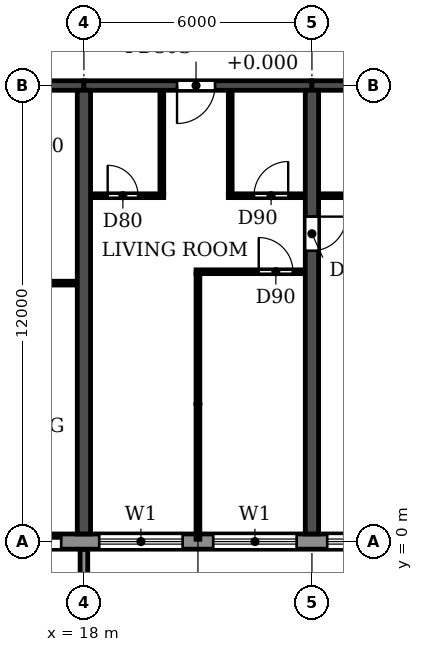
"""IFC4 building model, lengths in metres.
Left out: names, types, materials, properties, quantities, classifications, styles, units other than length and angle.
Written with IfcOpenShell. Run it as: python <this file> out.ifc"""

import sys

from ifc_helpers import new_model, si_unit, direction, frame, frame_2d, origin, place, context, subcontext, project, spatial, polyline, rectangle, outline, extrude, source, transform, mapped, element, fill, save


model = new_model("IFC4")
c1 = context("Model", 3, precision=1e-05, world=origin(), true_north=direction((0.0, 1.0)))
c2 = subcontext(c1, "Body", "Model", "MODEL_VIEW")
j1 = project(units=[si_unit("LENGTHUNIT", "METRE"), si_unit("PLANEANGLEUNIT", "RADIAN")], contexts=[c1])
p1 = place(None, origin())
s1 = spatial("IfcSite", under=j1, at=p1, CompositionType="ELEMENT")
p2 = place(p1, origin())
s2 = spatial("IfcBuilding", under=s1, at=p2, CompositionType="ELEMENT")
p3 = place(p2, frame((0.0, 0.0, 92.7)))
s3 = spatial("IfcBuildingStorey", under=s2, at=p3, CompositionType="ELEMENT", Elevation=92.7)
p4 = place(p3, frame((18.0, 0.2, 0.0), z_axis=(0.0, 0.0, 1.0), x_axis=(0.0, 1.0, 0.0)))
e1 = element("IfcWall", 1, at=p4, inside=s3, PredefinedType="SHEAR", context=c2, shape_type="SweptSolid", body=[
    extrude(rectangle(XDim=11.675, YDim=0.35, at=frame_2d((5.837, 0.0))), origin(), (0.0, 0.0, 1.0), 3.06),
])
p5 = place(p3, frame((24.0, 0.2, 0.0), z_axis=(0.0, 0.0, 1.0), x_axis=(0.0, 1.0, 0.0)))
e2 = element("IfcWall", 2, at=p5, inside=s3, PredefinedType="SHEAR", context=c2, shape_type="SweptSolid", body=[
    extrude(rectangle(XDim=11.675, YDim=0.35, at=frame_2d((5.837, 0.0))), origin(), (0.0, 0.0, 1.0), 3.06),
])
p6 = place(p5, frame((7.45, 0.0, 0.0)))
e3 = element("IfcOpeningElement", 3, at=p6, cuts=e2, PredefinedType="OPENING", context=c2, shape_type="SweptSolid", body=[
    extrude(rectangle(XDim=0.9, YDim=2.1, at=frame_2d((0.45, 1.05))), frame((0.0, 0.185, 0.0), z_axis=(0.0, -1.0, 0.0), x_axis=(1.0, 0.0, 0.0)), (0.0, 0.0, 1.0), 0.37),
])
p7 = place(p3, frame((12.0, 12.0, 0.0), z_axis=(0.0, 0.0, 1.0), x_axis=(1.0, 0.0, 0.0)))
e4 = element("IfcWall", 4, at=p7, inside=s3, PredefinedType="SHEAR", context=c2, shape_type="SweptSolid", body=[
    extrude(rectangle(XDim=6.0, YDim=0.25, at=frame_2d((3.0, 0.0))), origin(), (0.0, 0.0, 1.0), 2.46),
])
p8 = place(p7, frame((2.55, 0.0, 0.0)))
e5 = element("IfcOpeningElement", 5, at=p8, cuts=e4, PredefinedType="OPENING", context=c2, shape_type="SweptSolid", body=[
    extrude(rectangle(XDim=1.0, YDim=2.1, at=frame_2d((0.5, 1.05))), frame((0.0, 0.135, 0.0), z_axis=(0.0, -1.0, 0.0), x_axis=(1.0, 0.0, 0.0)), (0.0, 0.0, 1.0), 0.27),
])
p9 = place(p3, frame((18.0, 12.0, 0.0), z_axis=(0.0, 0.0, 1.0), x_axis=(1.0, 0.0, 0.0)))
e6 = element("IfcWall", 6, at=p9, inside=s3, PredefinedType="SHEAR", context=c2, shape_type="SweptSolid", body=[
    extrude(rectangle(XDim=6.0, YDim=0.25, at=frame_2d((3.0, 0.0))), origin(), (0.0, 0.0, 1.0), 2.46),
])
p10 = place(p9, frame((2.45, 0.0, 0.0)))
e7 = element("IfcOpeningElement", 7, at=p10, cuts=e6, PredefinedType="OPENING", context=c2, shape_type="SweptSolid", body=[
    extrude(rectangle(XDim=1.0, YDim=2.1, at=frame_2d((0.5, 1.05))), frame((0.0, 0.135, 0.0), z_axis=(0.0, -1.0, 0.0), x_axis=(1.0, 0.0, 0.0)), (0.0, 0.0, 1.0), 0.27),
])
p11 = place(p3, frame((24.0, 12.0, 0.0), z_axis=(0.0, 0.0, 1.0), x_axis=(1.0, 0.0, 0.0)))
e8 = element("IfcWall", 8, at=p11, inside=s3, PredefinedType="SHEAR", context=c2, shape_type="SweptSolid", body=[
    extrude(rectangle(XDim=6.0, YDim=0.25, at=frame_2d((3.0, 0.0))), origin(), (0.0, 0.0, 1.0), 2.46),
])
p12 = place(p3, frame((10.683, 0.0, 0.0), z_axis=(0.0, 0.0, 1.0), x_axis=(1.0, 0.0, 0.0)))
e9 = element("IfcWall", 9, at=p12, inside=s3, PredefinedType="STANDARD", context=c2, shape_type="SweptSolid", body=[
    extrude(rectangle(XDim=80.634, YDim=0.4, at=frame_2d((40.317, 0.0))), origin(), (0.0, 0.0, 1.0), 3.06),
])
p13 = place(p12, frame((1.717, 0.0, 0.9)))
e10 = element("IfcOpeningElement", 10, at=p13, cuts=e9, PredefinedType="OPENING", context=c2, shape_type="SweptSolid", body=[
    extrude(rectangle(XDim=2.2, YDim=1.5, at=frame_2d((1.1, 0.75))), frame((0.0, 0.21, 0.0), z_axis=(0.0, -1.0, 0.0), x_axis=(1.0, 0.0, 0.0)), (0.0, 0.0, 1.0), 0.42),
])
p14 = place(p12, frame((4.917, 0.0, 0.0)))
e11 = element("IfcOpeningElement", 11, at=p14, cuts=e9, PredefinedType="OPENING", context=c2, shape_type="SweptSolid", body=[
    extrude(rectangle(XDim=1.8, YDim=2.4, at=frame_2d((0.9, 1.2))), frame((0.0, 0.21, 0.0), z_axis=(0.0, -1.0, 0.0), x_axis=(1.0, 0.0, 0.0)), (0.0, 0.0, 1.0), 0.42),
])
p15 = place(p12, frame((7.717, 0.0, 0.9)))
e12 = element("IfcOpeningElement", 12, at=p15, cuts=e9, PredefinedType="OPENING", context=c2, shape_type="SweptSolid", body=[
    extrude(rectangle(XDim=2.2, YDim=1.5, at=frame_2d((1.1, 0.75))), frame((0.0, 0.21, 0.0), z_axis=(0.0, -1.0, 0.0), x_axis=(1.0, 0.0, 0.0)), (0.0, 0.0, 1.0), 0.42),
])
p16 = place(p12, frame((10.717, 0.0, 0.9)))
e13 = element("IfcOpeningElement", 13, at=p16, cuts=e9, PredefinedType="OPENING", context=c2, shape_type="SweptSolid", body=[
    extrude(rectangle(XDim=2.2, YDim=1.5, at=frame_2d((1.1, 0.75))), frame((0.0, 0.21, 0.0), z_axis=(0.0, -1.0, 0.0), x_axis=(1.0, 0.0, 0.0)), (0.0, 0.0, 1.0), 0.42),
])
p17 = place(p12, frame((13.717, 0.0, 0.9)))
e14 = element("IfcOpeningElement", 14, at=p17, cuts=e9, PredefinedType="OPENING", context=c2, shape_type="SweptSolid", body=[
    extrude(rectangle(XDim=2.2, YDim=1.5, at=frame_2d((1.1, 0.75))), frame((0.0, 0.21, 0.0), z_axis=(0.0, -1.0, 0.0), x_axis=(1.0, 0.0, 0.0)), (0.0, 0.0, 1.0), 0.42),
])
p18 = place(p12, frame((16.717, 0.0, 0.9)))
e15 = element("IfcOpeningElement", 15, at=p18, cuts=e9, PredefinedType="OPENING", context=c2, shape_type="SweptSolid", body=[
    extrude(rectangle(XDim=2.2, YDim=1.5, at=frame_2d((1.1, 0.75))), frame((0.0, 0.21, 0.0), z_axis=(0.0, -1.0, 0.0), x_axis=(1.0, 0.0, 0.0)), (0.0, 0.0, 1.0), 0.42),
])
p19 = place(p12, frame((19.717, 0.0, 0.9)))
e16 = element("IfcOpeningElement", 16, at=p19, cuts=e9, PredefinedType="OPENING", context=c2, shape_type="SweptSolid", body=[
    extrude(rectangle(XDim=2.2, YDim=1.5, at=frame_2d((1.1, 0.75))), frame((0.0, 0.21, 0.0), z_axis=(0.0, -1.0, 0.0), x_axis=(1.0, 0.0, 0.0)), (0.0, 0.0, 1.0), 0.42),
])
p20 = place(p12, frame((22.717, 0.0, 0.9)))
e17 = element("IfcOpeningElement", 17, at=p20, cuts=e9, PredefinedType="OPENING", context=c2, shape_type="SweptSolid", body=[
    extrude(rectangle(XDim=2.2, YDim=1.5, at=frame_2d((1.1, 0.75))), frame((0.0, 0.21, 0.0), z_axis=(0.0, -1.0, 0.0), x_axis=(1.0, 0.0, 0.0)), (0.0, 0.0, 1.0), 0.42),
])
p21 = place(p12, frame((25.717, 0.0, 0.9)))
e18 = element("IfcOpeningElement", 18, at=p21, cuts=e9, PredefinedType="OPENING", context=c2, shape_type="SweptSolid", body=[
    extrude(rectangle(XDim=2.2, YDim=1.5, at=frame_2d((1.1, 0.75))), frame((0.0, 0.21, 0.0), z_axis=(0.0, -1.0, 0.0), x_axis=(1.0, 0.0, 0.0)), (0.0, 0.0, 1.0), 0.42),
])
p22 = place(p12, frame((28.917, 0.0, 0.0)))
e19 = element("IfcOpeningElement", 19, at=p22, cuts=e9, PredefinedType="OPENING", context=c2, shape_type="SweptSolid", body=[
    extrude(rectangle(XDim=1.8, YDim=2.4, at=frame_2d((0.9, 1.2))), frame((0.0, 0.21, 0.0), z_axis=(0.0, -1.0, 0.0), x_axis=(1.0, 0.0, 0.0)), (0.0, 0.0, 1.0), 0.42),
])
p23 = place(p12, frame((31.717, 0.0, 0.9)))
e20 = element("IfcOpeningElement", 20, at=p23, cuts=e9, PredefinedType="OPENING", context=c2, shape_type="SweptSolid", body=[
    extrude(rectangle(XDim=2.2, YDim=1.5, at=frame_2d((1.1, 0.75))), frame((0.0, 0.21, 0.0), z_axis=(0.0, -1.0, 0.0), x_axis=(1.0, 0.0, 0.0)), (0.0, 0.0, 1.0), 0.42),
])
p24 = place(p12, frame((34.717, 0.0, 0.9)))
e21 = element("IfcOpeningElement", 21, at=p24, cuts=e9, PredefinedType="OPENING", context=c2, shape_type="SweptSolid", body=[
    extrude(rectangle(XDim=2.2, YDim=1.5, at=frame_2d((1.1, 0.75))), frame((0.0, 0.21, 0.0), z_axis=(0.0, -1.0, 0.0), x_axis=(1.0, 0.0, 0.0)), (0.0, 0.0, 1.0), 0.42),
])
p25 = place(p12, frame((37.917, 0.0, 0.0)))
e22 = element("IfcOpeningElement", 22, at=p25, cuts=e9, PredefinedType="OPENING", context=c2, shape_type="SweptSolid", body=[
    extrude(rectangle(XDim=1.8, YDim=2.4, at=frame_2d((0.9, 1.2))), frame((0.0, 0.21, 0.0), z_axis=(0.0, -1.0, 0.0), x_axis=(1.0, 0.0, 0.0)), (0.0, 0.0, 1.0), 0.42),
])
p26 = place(p12, frame((40.717, 0.0, 0.9)))
e23 = element("IfcOpeningElement", 23, at=p26, cuts=e9, PredefinedType="OPENING", context=c2, shape_type="SweptSolid", body=[
    extrude(rectangle(XDim=2.2, YDim=1.5, at=frame_2d((1.1, 0.75))), frame((0.0, 0.21, 0.0), z_axis=(0.0, -1.0, 0.0), x_axis=(1.0, 0.0, 0.0)), (0.0, 0.0, 1.0), 0.42),
])
p27 = place(p12, frame((43.717, 0.0, 0.9)))
e24 = element("IfcOpeningElement", 24, at=p27, cuts=e9, PredefinedType="OPENING", context=c2, shape_type="SweptSolid", body=[
    extrude(rectangle(XDim=2.2, YDim=1.5, at=frame_2d((1.1, 0.75))), frame((0.0, 0.21, 0.0), z_axis=(0.0, -1.0, 0.0), x_axis=(1.0, 0.0, 0.0)), (0.0, 0.0, 1.0), 0.42),
])
p28 = place(p12, frame((46.717, 0.0, 0.9)))
e25 = element("IfcOpeningElement", 25, at=p28, cuts=e9, PredefinedType="OPENING", context=c2, shape_type="SweptSolid", body=[
    extrude(rectangle(XDim=2.2, YDim=1.5, at=frame_2d((1.1, 0.75))), frame((0.0, 0.21, 0.0), z_axis=(0.0, -1.0, 0.0), x_axis=(1.0, 0.0, 0.0)), (0.0, 0.0, 1.0), 0.42),
])
p29 = place(p12, frame((49.717, 0.0, 0.9)))
e26 = element("IfcOpeningElement", 26, at=p29, cuts=e9, PredefinedType="OPENING", context=c2, shape_type="SweptSolid", body=[
    extrude(rectangle(XDim=2.2, YDim=1.5, at=frame_2d((1.1, 0.75))), frame((0.0, 0.21, 0.0), z_axis=(0.0, -1.0, 0.0), x_axis=(1.0, 0.0, 0.0)), (0.0, 0.0, 1.0), 0.42),
])
p30 = place(p12, frame((52.917, 0.0, 0.0)))
e27 = element("IfcOpeningElement", 27, at=p30, cuts=e9, PredefinedType="OPENING", context=c2, shape_type="SweptSolid", body=[
    extrude(rectangle(XDim=1.8, YDim=2.4, at=frame_2d((0.9, 1.2))), frame((0.0, 0.21, 0.0), z_axis=(0.0, -1.0, 0.0), x_axis=(1.0, 0.0, 0.0)), (0.0, 0.0, 1.0), 0.42),
])
p31 = place(p12, frame((55.717, 0.0, 0.9)))
e28 = element("IfcOpeningElement", 28, at=p31, cuts=e9, PredefinedType="OPENING", context=c2, shape_type="SweptSolid", body=[
    extrude(rectangle(XDim=2.2, YDim=1.5, at=frame_2d((1.1, 0.75))), frame((0.0, 0.21, 0.0), z_axis=(0.0, -1.0, 0.0), x_axis=(1.0, 0.0, 0.0)), (0.0, 0.0, 1.0), 0.42),
])
p32 = place(p12, frame((58.717, 0.0, 0.9)))
e29 = element("IfcOpeningElement", 29, at=p32, cuts=e9, PredefinedType="OPENING", context=c2, shape_type="SweptSolid", body=[
    extrude(rectangle(XDim=2.2, YDim=1.5, at=frame_2d((1.1, 0.75))), frame((0.0, 0.21, 0.0), z_axis=(0.0, -1.0, 0.0), x_axis=(1.0, 0.0, 0.0)), (0.0, 0.0, 1.0), 0.42),
])
p33 = place(p12, frame((61.717, 0.0, 0.9)))
e30 = element("IfcOpeningElement", 30, at=p33, cuts=e9, PredefinedType="OPENING", context=c2, shape_type="SweptSolid", body=[
    extrude(rectangle(XDim=2.2, YDim=1.5, at=frame_2d((1.1, 0.75))), frame((0.0, 0.21, 0.0), z_axis=(0.0, -1.0, 0.0), x_axis=(1.0, 0.0, 0.0)), (0.0, 0.0, 1.0), 0.42),
])
p34 = place(p12, frame((64.917, 0.0, 0.0)))
e31 = element("IfcOpeningElement", 31, at=p34, cuts=e9, PredefinedType="OPENING", context=c2, shape_type="SweptSolid", body=[
    extrude(rectangle(XDim=1.8, YDim=2.4, at=frame_2d((0.9, 1.2))), frame((0.0, 0.21, 0.0), z_axis=(0.0, -1.0, 0.0), x_axis=(1.0, 0.0, 0.0)), (0.0, 0.0, 1.0), 0.42),
])
p35 = place(p12, frame((67.717, 0.0, 0.9)))
e32 = element("IfcOpeningElement", 32, at=p35, cuts=e9, PredefinedType="OPENING", context=c2, shape_type="SweptSolid", body=[
    extrude(rectangle(XDim=2.2, YDim=1.5, at=frame_2d((1.1, 0.75))), frame((0.0, 0.21, 0.0), z_axis=(0.0, -1.0, 0.0), x_axis=(1.0, 0.0, 0.0)), (0.0, 0.0, 1.0), 0.42),
])
p36 = place(p12, frame((70.717, 0.0, 0.9)))
e33 = element("IfcOpeningElement", 33, at=p36, cuts=e9, PredefinedType="OPENING", context=c2, shape_type="SweptSolid", body=[
    extrude(rectangle(XDim=2.2, YDim=1.5, at=frame_2d((1.1, 0.75))), frame((0.0, 0.21, 0.0), z_axis=(0.0, -1.0, 0.0), x_axis=(1.0, 0.0, 0.0)), (0.0, 0.0, 1.0), 0.42),
])
p37 = place(p12, frame((73.917, 0.0, 0.0)))
e34 = element("IfcOpeningElement", 34, at=p37, cuts=e9, PredefinedType="OPENING", context=c2, shape_type="SweptSolid", body=[
    extrude(rectangle(XDim=1.8, YDim=2.4, at=frame_2d((0.9, 1.2))), frame((0.0, 0.21, 0.0), z_axis=(0.0, -1.0, 0.0), x_axis=(1.0, 0.0, 0.0)), (0.0, 0.0, 1.0), 0.42),
])
p38 = place(p12, frame((76.717, 0.0, 0.9)))
e35 = element("IfcOpeningElement", 35, at=p38, cuts=e9, PredefinedType="OPENING", context=c2, shape_type="SweptSolid", body=[
    extrude(rectangle(XDim=2.2, YDim=1.5, at=frame_2d((1.1, 0.75))), frame((0.0, 0.21, 0.0), z_axis=(0.0, -1.0, 0.0), x_axis=(1.0, 0.0, 0.0)), (0.0, 0.0, 1.0), 0.42),
])
m1 = source(origin(), c2, "Body", "SweptSolid", [
    extrude(outline(polyline([(0.0, 0.0), (0.2, 0.0), (0.2, 1.65), (0.0, 1.65), (0.0, 0.0)])), origin(), (0.0, 0.0, 1.0), 3.1),
])
p39 = place(p3, frame((17.9, -1.85, 0.0)))
e36 = element("IfcWall", 36, at=p39, inside=s3, PredefinedType="STANDARD", context=c2, shape_type="MappedRepresentation", body=[
    mapped(m1, transform((0.0, 0.0, 0.0))),
])
p40 = place(p3, frame((15.9, 6.8, 0.0), z_axis=(0.0, 0.0, 1.0), x_axis=(1.0, 0.0, 0.0)))
e37 = element("IfcWall", 37, at=p40, inside=s3, PredefinedType="PARTITIONING", context=c2, shape_type="SweptSolid", body=[
    extrude(rectangle(XDim=1.915, YDim=0.1, at=frame_2d((0.958, 0.0))), origin(), (0.0, 0.0, 1.0), 3.06),
])
p41 = place(p3, frame((20.95, 7.1, 0.0), z_axis=(0.0, 0.0, 1.0), x_axis=(1.0, 0.0, 0.0)))
e38 = element("IfcWall", 38, at=p41, inside=s3, PredefinedType="PARTITIONING", context=c2, shape_type="SweptSolid", body=[
    extrude(rectangle(XDim=2.865, YDim=0.1, at=frame_2d((1.433, 0.0))), origin(), (0.0, 0.0, 1.0), 3.06),
])
p42 = place(p41, frame((1.65, 0.0, 0.0)))
e39 = element("IfcOpeningElement", 39, at=p42, cuts=e38, PredefinedType="OPENING", context=c2, shape_type="SweptSolid", body=[
    extrude(rectangle(XDim=0.9, YDim=2.1, at=frame_2d((0.45, 1.05))), frame((0.0, 0.06, 0.0), z_axis=(0.0, -1.0, 0.0), x_axis=(1.0, 0.0, 0.0)), (0.0, 0.0, 1.0), 0.12),
])
p43 = place(p3, frame((18.185, 9.1, 0.0), z_axis=(0.0, 0.0, 1.0), x_axis=(1.0, 0.0, 0.0)))
e40 = element("IfcWall", 40, at=p43, inside=s3, PredefinedType="PARTITIONING", context=c2, shape_type="SweptSolid", body=[
    extrude(rectangle(XDim=1.915, YDim=0.1, at=frame_2d((0.958, 0.0))), origin(), (0.0, 0.0, 1.0), 3.06),
])
p44 = place(p43, frame((0.44, 0.0, 0.0)))
e41 = element("IfcOpeningElement", 41, at=p44, cuts=e40, PredefinedType="OPENING", context=c2, shape_type="SweptSolid", body=[
    extrude(rectangle(XDim=0.8, YDim=2.1, at=frame_2d((0.4, 1.05))), frame((0.0, 0.06, 0.0), z_axis=(0.0, -1.0, 0.0), x_axis=(1.0, 0.0, 0.0)), (0.0, 0.0, 1.0), 0.12),
])
p45 = place(p3, frame((21.8, 9.1, 0.0), z_axis=(0.0, 0.0, 1.0), x_axis=(1.0, 0.0, 0.0)))
e42 = element("IfcWall", 42, at=p45, inside=s3, PredefinedType="PARTITIONING", context=c2, shape_type="SweptSolid", body=[
    extrude(rectangle(XDim=2.015, YDim=0.1, at=frame_2d((1.007, 0.0))), origin(), (0.0, 0.0, 1.0), 3.06),
])
p46 = place(p45, frame((0.675, 0.0, 0.0)))
e43 = element("IfcOpeningElement", 43, at=p46, cuts=e42, PredefinedType="OPENING", context=c2, shape_type="SweptSolid", body=[
    extrude(rectangle(XDim=0.9, YDim=2.1, at=frame_2d((0.45, 1.05))), frame((0.0, 0.06, 0.0), z_axis=(0.0, -1.0, 0.0), x_axis=(1.0, 0.0, 0.0)), (0.0, 0.0, 1.0), 0.12),
])
p47 = place(p3, frame((24.185, 9.1, 0.0), z_axis=(0.0, 0.0, 1.0), x_axis=(1.0, 0.0, 0.0)))
e44 = element("IfcWall", 44, at=p47, inside=s3, PredefinedType="PARTITIONING", context=c2, shape_type="SweptSolid", body=[
    extrude(rectangle(XDim=2.715, YDim=0.1, at=frame_2d((1.357, 0.0))), origin(), (0.0, 0.0, 1.0), 3.06),
])
p48 = place(p47, frame((0.915, 0.0, 0.0)))
e45 = element("IfcOpeningElement", 45, at=p48, cuts=e44, PredefinedType="OPENING", context=c2, shape_type="SweptSolid", body=[
    extrude(rectangle(XDim=0.8, YDim=2.1, at=frame_2d((0.4, 1.05))), frame((0.0, 0.06, 0.0), z_axis=(0.0, -1.0, 0.0), x_axis=(1.0, 0.0, 0.0)), (0.0, 0.0, 1.0), 0.12),
])
p49 = place(p3, frame((20.05, 9.15, 0.0), z_axis=(0.0, 0.0, 1.0), x_axis=(0.0, 1.0, 0.0)))
e46 = element("IfcWall", 46, at=p49, inside=s3, PredefinedType="PARTITIONING", context=c2, shape_type="SweptSolid", body=[
    extrude(rectangle(XDim=2.715, YDim=0.1, at=frame_2d((1.357, 0.0))), origin(), (0.0, 0.0, 1.0), 3.06),
])
p50 = place(p3, frame((21.0, 0.06, 0.0), z_axis=(0.0, 0.0, 1.0), x_axis=(0.0, 1.0, 0.0)))
e47 = element("IfcWall", 47, at=p50, inside=s3, PredefinedType="PARTITIONING", context=c2, shape_type="SweptSolid", body=[
    extrude(rectangle(XDim=6.99, YDim=0.1, at=frame_2d((3.495, 0.0))), origin(), (0.0, 0.0, 1.0), 3.06),
])
p51 = place(p3, frame((21.85, 9.15, 0.0), z_axis=(0.0, 0.0, 1.0), x_axis=(0.0, 1.0, 0.0)))
e48 = element("IfcWall", 48, at=p51, inside=s3, PredefinedType="PARTITIONING", context=c2, shape_type="SweptSolid", body=[
    extrude(rectangle(XDim=2.715, YDim=0.1, at=frame_2d((1.357, 0.0))), origin(), (0.0, 0.0, 1.0), 3.06),
])
p52 = place(p14, origin())
e49 = element("IfcDoor", 49, at=p52, inside=s3, OperationType="DOUBLE_DOOR_SLIDING", PredefinedType="DOOR", context=c2, shape_type="SweptSolid", body=[
    extrude(rectangle(XDim=1.8, YDim=2.4, at=frame_2d((0.9, 1.2))), frame((0.0, 0.025, 0.0), z_axis=(0.0, -1.0, 0.0), x_axis=(1.0, 0.0, 0.0)), (0.0, 0.0, 1.0), 0.05),
])
fill(e11, e49)
p53 = place(p15, origin())
e50 = element("IfcWindow", 50, at=p53, inside=s3, PartitioningType="DOUBLE_PANEL_HORIZONTAL", PredefinedType="WINDOW", context=c2, shape_type="SweptSolid", body=[
    extrude(rectangle(XDim=2.2, YDim=1.5, at=frame_2d((1.1, 0.75))), frame((0.0, 0.03, 0.0), z_axis=(0.0, -1.0, 0.0), x_axis=(1.0, 0.0, 0.0)), (0.0, 0.0, 1.0), 0.06),
])
fill(e12, e50)
p54 = place(p16, origin())
e51 = element("IfcWindow", 51, at=p54, inside=s3, PartitioningType="DOUBLE_PANEL_HORIZONTAL", PredefinedType="WINDOW", context=c2, shape_type="SweptSolid", body=[
    extrude(rectangle(XDim=2.2, YDim=1.5, at=frame_2d((1.1, 0.75))), frame((0.0, 0.03, 0.0), z_axis=(0.0, -1.0, 0.0), x_axis=(1.0, 0.0, 0.0)), (0.0, 0.0, 1.0), 0.06),
])
fill(e13, e51)
p55 = place(p17, origin())
e52 = element("IfcWindow", 52, at=p55, inside=s3, PartitioningType="DOUBLE_PANEL_HORIZONTAL", PredefinedType="WINDOW", context=c2, shape_type="SweptSolid", body=[
    extrude(rectangle(XDim=2.2, YDim=1.5, at=frame_2d((1.1, 0.75))), frame((0.0, 0.03, 0.0), z_axis=(0.0, -1.0, 0.0), x_axis=(1.0, 0.0, 0.0)), (0.0, 0.0, 1.0), 0.06),
])
fill(e14, e52)
p56 = place(p44, origin())
e53 = element("IfcDoor", 53, at=p56, inside=s3, OperationType="SINGLE_SWING_LEFT", PredefinedType="DOOR", context=c2, shape_type="SweptSolid", body=[
    extrude(rectangle(XDim=0.8, YDim=2.1, at=frame_2d((0.4, 1.05))), frame((0.0, 0.025, 0.0), z_axis=(0.0, -1.0, 0.0), x_axis=(1.0, 0.0, 0.0)), (0.0, 0.0, 1.0), 0.05),
])
fill(e41, e53)
p57 = place(p10, frame((1.0, 0.0, 0.0), z_axis=(0.0, 0.0, 1.0), x_axis=(-1.0, 0.0, 0.0)))
e54 = element("IfcDoor", 54, at=p57, inside=s3, OperationType="SINGLE_SWING_RIGHT", PredefinedType="DOOR", context=c2, shape_type="SweptSolid", body=[
    extrude(rectangle(XDim=1.0, YDim=2.1, at=frame_2d((0.5, 1.05))), frame((0.0, 0.025, 0.0), z_axis=(0.0, -1.0, 0.0), x_axis=(1.0, 0.0, 0.0)), (0.0, 0.0, 1.0), 0.05),
])
fill(e7, e54)
p58 = place(p46, origin())
e55 = element("IfcDoor", 55, at=p58, inside=s3, OperationType="SINGLE_SWING_RIGHT", PredefinedType="DOOR", context=c2, shape_type="SweptSolid", body=[
    extrude(rectangle(XDim=0.9, YDim=2.1, at=frame_2d((0.45, 1.05))), frame((0.0, 0.025, 0.0), z_axis=(0.0, -1.0, 0.0), x_axis=(1.0, 0.0, 0.0)), (0.0, 0.0, 1.0), 0.05),
])
fill(e43, e55)
p59 = place(p42, origin())
e56 = element("IfcDoor", 56, at=p59, inside=s3, OperationType="SINGLE_SWING_LEFT", PredefinedType="DOOR", context=c2, shape_type="SweptSolid", body=[
    extrude(rectangle(XDim=0.9, YDim=2.1, at=frame_2d((0.45, 1.05))), frame((0.0, 0.025, 0.0), z_axis=(0.0, -1.0, 0.0), x_axis=(1.0, 0.0, 0.0)), (0.0, 0.0, 1.0), 0.05),
])
fill(e39, e56)
p60 = place(p6, frame((0.9, 0.0, 0.0), z_axis=(0.0, 0.0, 1.0), x_axis=(-1.0, 0.0, 0.0)))
e57 = element("IfcDoor", 57, at=p60, inside=s3, OperationType="SINGLE_SWING_LEFT", PredefinedType="DOOR", context=c2, shape_type="SweptSolid", body=[
    extrude(rectangle(XDim=0.9, YDim=2.1, at=frame_2d((0.45, 1.05))), frame((0.0, 0.025, 0.0), z_axis=(0.0, -1.0, 0.0), x_axis=(1.0, 0.0, 0.0)), (0.0, 0.0, 1.0), 0.05),
])
fill(e3, e57)
save(model, sys.argv[1])
